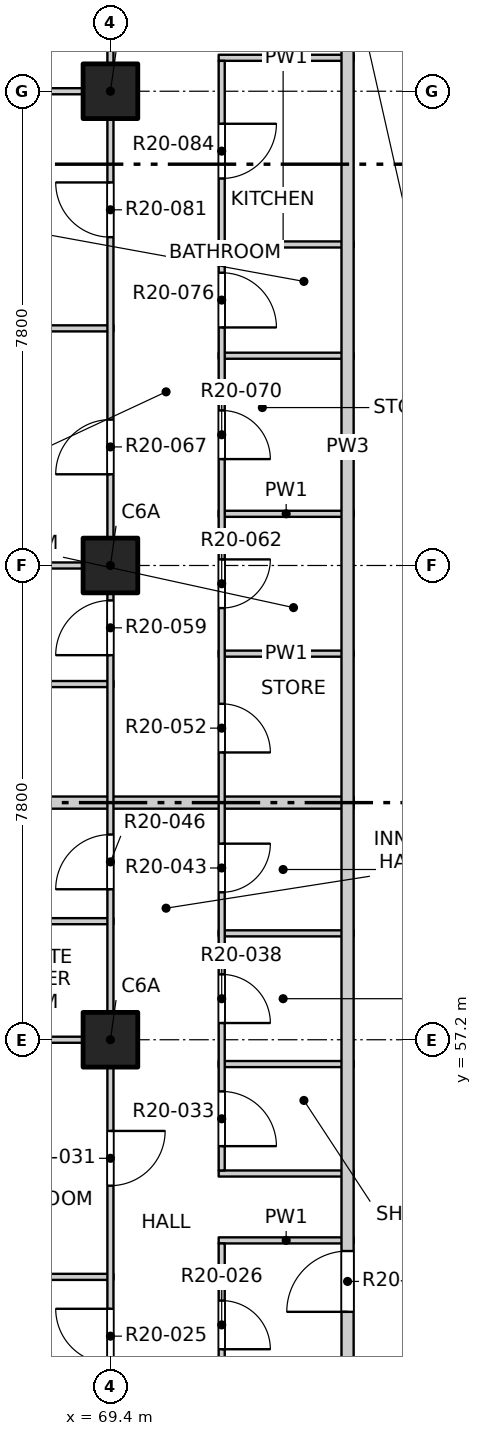
"""IFC4 building model, lengths in metres.
Left out: names, types, materials, properties, quantities, classifications, styles, units other than length and angle.
Written with IfcOpenShell. Run it as: python <this file> out.ifc"""

import sys

from ifc_helpers import new_model, si_unit, direction, frame, frame_2d, origin, origin_2d, place, context, subcontext, project, spatial, rectangle, extrude, element, fill, save


model = new_model("IFC4")
c1 = context("Model", 3, precision=1e-05, world=origin(), true_north=direction((0.0, 1.0)))
c2 = subcontext(c1, "Body", "Model", "MODEL_VIEW")
j1 = project(units=[si_unit("LENGTHUNIT", "METRE"), si_unit("PLANEANGLEUNIT", "RADIAN")], contexts=[c1])
p1 = place(None, origin())
s1 = spatial("IfcSite", under=j1, at=p1, CompositionType="ELEMENT")
p2 = place(p1, origin())
s2 = spatial("IfcBuilding", under=s1, at=p2, CompositionType="ELEMENT")
p3 = place(p2, frame((0.0, 0.0, 204.1)))
s3 = spatial("IfcBuildingStorey", under=s2, at=p3, CompositionType="ELEMENT", Elevation=204.1)
for number, where, z_axis, x_axis in (
    (1, (69.4, 57.2, -0.25), (0.0, 0.0, 1.0), (1.0, 0.0, 0.0)),
    (2, (69.4, 65.0, -0.25), (0.0, 0.0, 1.0), (1.0, 0.0, 0.0)),
    (3, (69.4, 72.8, -0.25), (0.0, 0.0, 1.0), (1.0, 0.0, 0.0)),
):
    element("IfcColumn", number, at=place(p3, frame(where, z_axis=z_axis, x_axis=x_axis)), inside=s3, PredefinedType="COLUMN", context=c2, shape_type="SweptSolid", body=[
        extrude(rectangle(XDim=0.9, YDim=0.9, at=origin_2d()), origin(), (0.0, 0.0, 1.0), 3.4),
    ])
p4 = place(p3, frame((61.9, 53.3, 0.0), z_axis=(0.0, 0.0, 1.0), x_axis=(1.0, 0.0, 0.0)))
e4 = element("IfcWall", 4, at=p4, inside=s3, PredefinedType="PARTITIONING", context=c2, shape_type="SweptSolid", body=[
    extrude(rectangle(XDim=7.55, YDim=0.1, at=frame_2d((3.775, 0.0))), origin(), (0.0, 0.0, 1.0), 3.15),
])
for number, where, z_axis, x_axis in (
    (5, (71.18, 53.9, 0.0), (0.0, 0.0, 1.0), (1.0, 0.0, 0.0)),
    (6, (71.18, 55.0, 0.0), (0.0, 0.0, 1.0), (1.0, 0.0, 0.0)),
    (7, (71.18, 56.8, 0.0), (0.0, 0.0, 1.0), (1.0, 0.0, 0.0)),
):
    element("IfcWall", number, at=place(p3, frame(where, z_axis=z_axis, x_axis=x_axis)), inside=s3, PredefinedType="PARTITIONING", context=c2, shape_type="SweptSolid", body=[
        extrude(rectangle(XDim=2.22, YDim=0.1, at=frame_2d((1.11, 0.0))), origin(), (0.0, 0.0, 1.0), 3.15),
    ])
p5 = place(p3, frame((61.9, 57.2, 0.0), z_axis=(0.0, 0.0, 1.0), x_axis=(1.0, 0.0, 0.0)))
e8 = element("IfcWall", 8, at=p5, inside=s3, PredefinedType="PARTITIONING", context=c2, shape_type="SweptSolid", body=[
    extrude(rectangle(XDim=7.55, YDim=0.1, at=frame_2d((3.775, 0.0))), origin(), (0.0, 0.0, 1.0), 3.15),
])
p6 = place(p3, frame((71.18, 58.95, 0.0), z_axis=(0.0, 0.0, 1.0), x_axis=(1.0, 0.0, 0.0)))
e9 = element("IfcWall", 9, at=p6, inside=s3, PredefinedType="PARTITIONING", context=c2, shape_type="SweptSolid", body=[
    extrude(rectangle(XDim=2.22, YDim=0.1, at=frame_2d((1.11, 0.0))), origin(), (0.0, 0.0, 1.0), 3.15),
])
p7 = place(p3, frame((66.05, 59.15, 0.0), z_axis=(0.0, 0.0, 1.0), x_axis=(1.0, 0.0, 0.0)))
e10 = element("IfcWall", 10, at=p7, inside=s3, PredefinedType="PARTITIONING", context=c2, shape_type="SweptSolid", body=[
    extrude(rectangle(XDim=3.4, YDim=0.1, at=frame_2d((1.7, 0.0))), origin(), (0.0, 0.0, 1.0), 3.15),
])
p8 = place(p3, frame((61.9, 61.1, 0.0), z_axis=(0.0, 0.0, 1.0), x_axis=(1.0, 0.0, 0.0)))
e11 = element("IfcWall", 11, at=p8, inside=s3, PredefinedType="PARTITIONING", context=c2, shape_type="SweptSolid", body=[
    extrude(rectangle(XDim=11.5, YDim=0.2, at=frame_2d((5.75, 0.0))), origin(), (0.0, 0.0, 1.0), 2.55),
])
p9 = place(p3, frame((65.75, 63.05, 0.0), z_axis=(0.0, 0.0, 1.0), x_axis=(1.0, 0.0, 0.0)))
e12 = element("IfcWall", 12, at=p9, inside=s3, PredefinedType="PARTITIONING", context=c2, shape_type="SweptSolid", body=[
    extrude(rectangle(XDim=3.7, YDim=0.1, at=frame_2d((1.85, 0.0))), origin(), (0.0, 0.0, 1.0), 3.15),
])
p10 = place(p3, frame((71.18, 63.55, 0.0), z_axis=(0.0, 0.0, 1.0), x_axis=(1.0, 0.0, 0.0)))
e13 = element("IfcWall", 13, at=p10, inside=s3, PredefinedType="PARTITIONING", context=c2, shape_type="SweptSolid", body=[
    extrude(rectangle(XDim=2.22, YDim=0.1, at=frame_2d((1.11, 0.0))), origin(), (0.0, 0.0, 1.0), 3.15),
])
p11 = place(p3, frame((61.9, 65.0, 0.0), z_axis=(0.0, 0.0, 1.0), x_axis=(1.0, 0.0, 0.0)))
e14 = element("IfcWall", 14, at=p11, inside=s3, PredefinedType="PARTITIONING", context=c2, shape_type="SweptSolid", body=[
    extrude(rectangle(XDim=7.55, YDim=0.1, at=frame_2d((3.775, 0.0))), origin(), (0.0, 0.0, 1.0), 3.15),
])
for number, where, z_axis, x_axis in (
    (15, (71.18, 65.85, 0.0), (0.0, 0.0, 1.0), (1.0, 0.0, 0.0)),
    (16, (71.18, 68.45, 0.0), (0.0, 0.0, 1.0), (1.0, 0.0, 0.0)),
):
    element("IfcWall", number, at=place(p3, frame(where, z_axis=z_axis, x_axis=x_axis)), inside=s3, PredefinedType="PARTITIONING", context=c2, shape_type="SweptSolid", body=[
        extrude(rectangle(XDim=2.22, YDim=0.1, at=frame_2d((1.11, 0.0))), origin(), (0.0, 0.0, 1.0), 3.15),
    ])
p12 = place(p3, frame((61.9, 68.9, 0.0), z_axis=(0.0, 0.0, 1.0), x_axis=(1.0, 0.0, 0.0)))
e17 = element("IfcWall", 17, at=p12, inside=s3, PredefinedType="PARTITIONING", context=c2, shape_type="SweptSolid", body=[
    extrude(rectangle(XDim=7.55, YDim=0.1, at=frame_2d((3.775, 0.0))), origin(), (0.0, 0.0, 1.0), 2.55),
])
p13 = place(p3, frame((71.18, 70.28, 0.0), z_axis=(0.0, 0.0, 1.0), x_axis=(1.0, 0.0, 0.0)))
e18 = element("IfcWall", 18, at=p13, inside=s3, PredefinedType="PARTITIONING", context=c2, shape_type="SweptSolid", body=[
    extrude(rectangle(XDim=2.22, YDim=0.1, at=frame_2d((1.11, 0.0))), origin(), (0.0, 0.0, 1.0), 3.15),
])
p14 = place(p3, frame((61.9, 72.8, 0.0), z_axis=(0.0, 0.0, 1.0), x_axis=(1.0, 0.0, 0.0)))
e19 = element("IfcWall", 19, at=p14, inside=s3, PredefinedType="PARTITIONING", context=c2, shape_type="SweptSolid", body=[
    extrude(rectangle(XDim=7.55, YDim=0.1, at=frame_2d((3.775, 0.0))), origin(), (0.0, 0.0, 1.0), 3.15),
])
p15 = place(p3, frame((71.18, 73.35, 0.0), z_axis=(0.0, 0.0, 1.0), x_axis=(1.0, 0.0, 0.0)))
e20 = element("IfcWall", 20, at=p15, inside=s3, PredefinedType="PARTITIONING", context=c2, shape_type="SweptSolid", body=[
    extrude(rectangle(XDim=2.22, YDim=0.1, at=frame_2d((1.11, 0.0))), origin(), (0.0, 0.0, 1.0), 3.15),
])
p16 = place(p3, frame((69.4, 41.9, 0.0), z_axis=(0.0, 0.0, 1.0), x_axis=(0.0, 1.0, 0.0)))
e21 = element("IfcWall", 21, at=p16, inside=s3, PredefinedType="PARTITIONING", context=c2, shape_type="SweptSolid", body=[
    extrude(rectangle(XDim=46.2, YDim=0.1, at=frame_2d((23.1, 0.0))), origin(), (0.0, 0.0, 1.0), 3.15),
])
p17 = place(p16, frame((1.2, 0.0, 0.0)))
e22 = element("IfcOpeningElement", 22, at=p17, cuts=e21, PredefinedType="OPENING", context=c2, shape_type="SweptSolid", body=[
    extrude(rectangle(XDim=0.9, YDim=2.1, at=frame_2d((0.45, 1.05))), frame((0.0, 0.06, 0.0), z_axis=(0.0, -1.0, 0.0), x_axis=(1.0, 0.0, 0.0)), (0.0, 0.0, 1.0), 0.12),
])
p18 = place(p16, frame((5.1, 0.0, 0.0)))
e23 = element("IfcOpeningElement", 23, at=p18, cuts=e21, PredefinedType="OPENING", context=c2, shape_type="SweptSolid", body=[
    extrude(rectangle(XDim=0.9, YDim=2.1, at=frame_2d((0.45, 1.05))), frame((0.0, 0.06, 0.0), z_axis=(0.0, -1.0, 0.0), x_axis=(1.0, 0.0, 0.0)), (0.0, 0.0, 1.0), 0.12),
])
p19 = place(p16, frame((9.975, 0.0, 0.0)))
e24 = element("IfcOpeningElement", 24, at=p19, cuts=e21, PredefinedType="OPENING", context=c2, shape_type="SweptSolid", body=[
    extrude(rectangle(XDim=0.9, YDim=2.1, at=frame_2d((0.45, 1.05))), frame((0.0, 0.06, 0.0), z_axis=(0.0, -1.0, 0.0), x_axis=(1.0, 0.0, 0.0)), (0.0, 0.0, 1.0), 0.12),
])
p20 = place(p16, frame((12.9, 0.0, 0.0)))
e25 = element("IfcOpeningElement", 25, at=p20, cuts=e21, PredefinedType="OPENING", context=c2, shape_type="SweptSolid", body=[
    extrude(rectangle(XDim=0.9, YDim=2.1, at=frame_2d((0.45, 1.05))), frame((0.0, 0.06, 0.0), z_axis=(0.0, -1.0, 0.0), x_axis=(1.0, 0.0, 0.0)), (0.0, 0.0, 1.0), 0.12),
])
p21 = place(p16, frame((17.775, 0.0, 0.0)))
e26 = element("IfcOpeningElement", 26, at=p21, cuts=e21, PredefinedType="OPENING", context=c2, shape_type="SweptSolid", body=[
    extrude(rectangle(XDim=0.9, YDim=2.1, at=frame_2d((0.45, 1.05))), frame((0.0, 0.06, 0.0), z_axis=(0.0, -1.0, 0.0), x_axis=(1.0, 0.0, 0.0)), (0.0, 0.0, 1.0), 0.12),
])
p22 = place(p16, frame((21.625, 0.0, 0.0)))
e27 = element("IfcOpeningElement", 27, at=p22, cuts=e21, PredefinedType="OPENING", context=c2, shape_type="SweptSolid", body=[
    extrude(rectangle(XDim=0.9, YDim=2.1, at=frame_2d((0.45, 1.05))), frame((0.0, 0.06, 0.0), z_axis=(0.0, -1.0, 0.0), x_axis=(1.0, 0.0, 0.0)), (0.0, 0.0, 1.0), 0.12),
])
p23 = place(p16, frame((24.6, 0.0, 0.0)))
e28 = element("IfcOpeningElement", 28, at=p23, cuts=e21, PredefinedType="OPENING", context=c2, shape_type="SweptSolid", body=[
    extrude(rectangle(XDim=0.9, YDim=2.1, at=frame_2d((0.45, 1.05))), frame((0.0, 0.06, 0.0), z_axis=(0.0, -1.0, 0.0), x_axis=(1.0, 0.0, 0.0)), (0.0, 0.0, 1.0), 0.12),
])
p24 = place(p16, frame((28.5, 0.0, 0.0)))
e29 = element("IfcOpeningElement", 29, at=p24, cuts=e21, PredefinedType="OPENING", context=c2, shape_type="SweptSolid", body=[
    extrude(rectangle(XDim=0.9, YDim=2.1, at=frame_2d((0.45, 1.05))), frame((0.0, 0.06, 0.0), z_axis=(0.0, -1.0, 0.0), x_axis=(1.0, 0.0, 0.0)), (0.0, 0.0, 1.0), 0.12),
])
p25 = place(p16, frame((33.375, 0.0, 0.0)))
e30 = element("IfcOpeningElement", 30, at=p25, cuts=e21, PredefinedType="OPENING", context=c2, shape_type="SweptSolid", body=[
    extrude(rectangle(XDim=0.9, YDim=2.1, at=frame_2d((0.45, 1.05))), frame((0.0, 0.06, 0.0), z_axis=(0.0, -1.0, 0.0), x_axis=(1.0, 0.0, 0.0)), (0.0, 0.0, 1.0), 0.12),
])
p26 = place(p16, frame((37.225, 0.0, 0.0)))
e31 = element("IfcOpeningElement", 31, at=p26, cuts=e21, PredefinedType="OPENING", context=c2, shape_type="SweptSolid", body=[
    extrude(rectangle(XDim=0.9, YDim=2.1, at=frame_2d((0.45, 1.05))), frame((0.0, 0.06, 0.0), z_axis=(0.0, -1.0, 0.0), x_axis=(1.0, 0.0, 0.0)), (0.0, 0.0, 1.0), 0.12),
])
p27 = place(p16, frame((40.2, 0.0, 0.0)))
e32 = element("IfcOpeningElement", 32, at=p27, cuts=e21, PredefinedType="OPENING", context=c2, shape_type="SweptSolid", body=[
    extrude(rectangle(XDim=0.9, YDim=2.1, at=frame_2d((0.45, 1.05))), frame((0.0, 0.06, 0.0), z_axis=(0.0, -1.0, 0.0), x_axis=(1.0, 0.0, 0.0)), (0.0, 0.0, 1.0), 0.12),
])
p28 = place(p16, frame((44.1, 0.0, 0.0)))
e33 = element("IfcOpeningElement", 33, at=p28, cuts=e21, PredefinedType="OPENING", context=c2, shape_type="SweptSolid", body=[
    extrude(rectangle(XDim=0.9, YDim=2.1, at=frame_2d((0.45, 1.05))), frame((0.0, 0.06, 0.0), z_axis=(0.0, -1.0, 0.0), x_axis=(1.0, 0.0, 0.0)), (0.0, 0.0, 1.0), 0.12),
])
p29 = place(p3, frame((71.23, 45.55, 0.0), z_axis=(0.0, 0.0, 1.0), x_axis=(0.0, 1.0, 0.0)))
e34 = element("IfcWall", 34, at=p29, inside=s3, PredefinedType="PARTITIONING", context=c2, shape_type="SweptSolid", body=[
    extrude(rectangle(XDim=8.3, YDim=0.1, at=frame_2d((4.15, 0.0))), origin(), (0.0, 0.0, 1.0), 3.15),
])
p30 = place(p29, frame((1.11, 0.0, 0.0)))
e35 = element("IfcOpeningElement", 35, at=p30, cuts=e34, PredefinedType="OPENING", context=c2, shape_type="SweptSolid", body=[
    extrude(rectangle(XDim=0.9, YDim=2.1, at=frame_2d((0.45, 1.05))), frame((0.0, 0.06, 0.0), z_axis=(0.0, -1.0, 0.0), x_axis=(1.0, 0.0, 0.0)), (0.0, 0.0, 1.0), 0.12),
])
p31 = place(p29, frame((3.92, 0.0, 0.0)))
e36 = element("IfcOpeningElement", 36, at=p31, cuts=e34, PredefinedType="OPENING", context=c2, shape_type="SweptSolid", body=[
    extrude(rectangle(XDim=0.9, YDim=2.1, at=frame_2d((0.45, 1.05))), frame((0.0, 0.06, 0.0), z_axis=(0.0, -1.0, 0.0), x_axis=(1.0, 0.0, 0.0)), (0.0, 0.0, 1.0), 0.12),
])
p32 = place(p29, frame((6.56, 0.0, 0.0)))
e37 = element("IfcOpeningElement", 37, at=p32, cuts=e34, PredefinedType="OPENING", context=c2, shape_type="SweptSolid", body=[
    extrude(rectangle(XDim=0.8, YDim=2.1, at=frame_2d((0.4, 1.05))), frame((0.0, 0.06, 0.0), z_axis=(0.0, -1.0, 0.0), x_axis=(1.0, 0.0, 0.0)), (0.0, 0.0, 1.0), 0.12),
])
p33 = place(p3, frame((71.23, 55.05, 0.0), z_axis=(0.0, 0.0, 1.0), x_axis=(0.0, 1.0, 0.0)))
e38 = element("IfcWall", 38, at=p33, inside=s3, PredefinedType="PARTITIONING", context=c2, shape_type="SweptSolid", body=[
    extrude(rectangle(XDim=18.25, YDim=0.1, at=frame_2d((9.125, 0.0))), origin(), (0.0, 0.0, 1.0), 3.15),
])
p34 = place(p33, frame((0.4, 0.0, 0.0)))
e39 = element("IfcOpeningElement", 39, at=p34, cuts=e38, PredefinedType="OPENING", context=c2, shape_type="SweptSolid", body=[
    extrude(rectangle(XDim=0.9, YDim=2.1, at=frame_2d((0.45, 1.05))), frame((0.0, 0.06, 0.0), z_axis=(0.0, -1.0, 0.0), x_axis=(1.0, 0.0, 0.0)), (0.0, 0.0, 1.0), 0.12),
])
p35 = place(p33, frame((2.425, 0.0, 0.0)))
e40 = element("IfcOpeningElement", 40, at=p35, cuts=e38, PredefinedType="OPENING", context=c2, shape_type="SweptSolid", body=[
    extrude(rectangle(XDim=0.8, YDim=2.1, at=frame_2d((0.4, 1.05))), frame((0.0, 0.06, 0.0), z_axis=(0.0, -1.0, 0.0), x_axis=(1.0, 0.0, 0.0)), (0.0, 0.0, 1.0), 0.12),
])
p36 = place(p33, frame((4.575, 0.0, 0.0)))
e41 = element("IfcOpeningElement", 41, at=p36, cuts=e38, PredefinedType="OPENING", context=c2, shape_type="SweptSolid", body=[
    extrude(rectangle(XDim=0.8, YDim=2.1, at=frame_2d((0.4, 1.05))), frame((0.0, 0.06, 0.0), z_axis=(0.0, -1.0, 0.0), x_axis=(1.0, 0.0, 0.0)), (0.0, 0.0, 1.0), 0.12),
])
p37 = place(p33, frame((6.875, 0.0, 0.0)))
e42 = element("IfcOpeningElement", 42, at=p37, cuts=e38, PredefinedType="OPENING", context=c2, shape_type="SweptSolid", body=[
    extrude(rectangle(XDim=0.8, YDim=2.1, at=frame_2d((0.4, 1.05))), frame((0.0, 0.06, 0.0), z_axis=(0.0, -1.0, 0.0), x_axis=(1.0, 0.0, 0.0)), (0.0, 0.0, 1.0), 0.12),
])
p38 = place(p33, frame((9.25, 0.0, 0.0)))
e43 = element("IfcOpeningElement", 43, at=p38, cuts=e38, PredefinedType="OPENING", context=c2, shape_type="SweptSolid", body=[
    extrude(rectangle(XDim=0.8, YDim=2.1, at=frame_2d((0.4, 1.05))), frame((0.0, 0.06, 0.0), z_axis=(0.0, -1.0, 0.0), x_axis=(1.0, 0.0, 0.0)), (0.0, 0.0, 1.0), 0.12),
])
p39 = place(p33, frame((11.7, 0.0, 0.0)))
e44 = element("IfcOpeningElement", 44, at=p39, cuts=e38, PredefinedType="OPENING", context=c2, shape_type="SweptSolid", body=[
    extrude(rectangle(XDim=0.8, YDim=2.1, at=frame_2d((0.4, 1.05))), frame((0.0, 0.06, 0.0), z_axis=(0.0, -1.0, 0.0), x_axis=(1.0, 0.0, 0.0)), (0.0, 0.0, 1.0), 0.12),
])
p40 = place(p33, frame((13.865, 0.0, 0.0)))
e45 = element("IfcOpeningElement", 45, at=p40, cuts=e38, PredefinedType="OPENING", context=c2, shape_type="SweptSolid", body=[
    extrude(rectangle(XDim=0.9, YDim=2.1, at=frame_2d((0.45, 1.05))), frame((0.0, 0.06, 0.0), z_axis=(0.0, -1.0, 0.0), x_axis=(1.0, 0.0, 0.0)), (0.0, 0.0, 1.0), 0.12),
])
p41 = place(p33, frame((16.315, 0.0, 0.0)))
e46 = element("IfcOpeningElement", 46, at=p41, cuts=e38, PredefinedType="OPENING", context=c2, shape_type="SweptSolid", body=[
    extrude(rectangle(XDim=0.9, YDim=2.1, at=frame_2d((0.45, 1.05))), frame((0.0, 0.06, 0.0), z_axis=(0.0, -1.0, 0.0), x_axis=(1.0, 0.0, 0.0)), (0.0, 0.0, 1.0), 0.12),
])
p42 = place(p3, frame((73.3, 49.5, 0.0), z_axis=(0.0, 0.0, 1.0), x_axis=(0.0, 1.0, 0.0)))
e47 = element("IfcWall", 47, at=p42, inside=s3, PredefinedType="PARTITIONING", context=c2, shape_type="SweptSolid", body=[
    extrude(rectangle(XDim=34.9, YDim=0.2, at=frame_2d((17.45, 0.0))), origin(), (0.0, 0.0, 1.0), 3.15),
])
p43 = place(p42, frame((3.225, 0.0, 0.0)))
e48 = element("IfcOpeningElement", 48, at=p43, cuts=e47, PredefinedType="OPENING", context=c2, shape_type="SweptSolid", body=[
    extrude(rectangle(XDim=1.0, YDim=2.1, at=frame_2d((0.5, 1.05))), frame((0.0, 0.11, 0.0), z_axis=(0.0, -1.0, 0.0), x_axis=(1.0, 0.0, 0.0)), (0.0, 0.0, 1.0), 0.22),
])
p44 = place(p42, frame((25.125, 0.0, 0.0)))
e49 = element("IfcOpeningElement", 49, at=p44, cuts=e47, PredefinedType="OPENING", context=c2, shape_type="SweptSolid", body=[
    extrude(rectangle(XDim=1.0, YDim=2.1, at=frame_2d((0.5, 1.05))), frame((0.0, 0.11, 0.0), z_axis=(0.0, -1.0, 0.0), x_axis=(1.0, 0.0, 0.0)), (0.0, 0.0, 1.0), 0.22),
])
p45 = place(p42, frame((31.475, 0.0, 0.0)))
e50 = element("IfcOpeningElement", 50, at=p45, cuts=e47, PredefinedType="OPENING", context=c2, shape_type="SweptSolid", body=[
    extrude(rectangle(XDim=1.0, YDim=2.1, at=frame_2d((0.5, 1.05))), frame((0.0, 0.11, 0.0), z_axis=(0.0, -1.0, 0.0), x_axis=(1.0, 0.0, 0.0)), (0.0, 0.0, 1.0), 0.22),
])
p46 = place(p19, origin())
e51 = element("IfcDoor", 51, at=p46, inside=s3, OperationType="SINGLE_SWING_RIGHT", PredefinedType="DOOR", context=c2, shape_type="SweptSolid", body=[
    extrude(rectangle(XDim=0.9, YDim=2.1, at=frame_2d((0.45, 1.05))), frame((0.0, 0.025, 0.0), z_axis=(0.0, -1.0, 0.0), x_axis=(1.0, 0.0, 0.0)), (0.0, 0.0, 1.0), 0.05),
])
fill(e24, e51)
p47 = place(p32, origin())
e52 = element("IfcDoor", 52, at=p47, inside=s3, OperationType="SINGLE_SWING_RIGHT", PredefinedType="DOOR", context=c2, shape_type="SweptSolid", body=[
    extrude(rectangle(XDim=0.8, YDim=2.1, at=frame_2d((0.4, 1.05))), frame((0.0, 0.025, 0.0), z_axis=(0.0, -1.0, 0.0), x_axis=(1.0, 0.0, 0.0)), (0.0, 0.0, 1.0), 0.05),
])
fill(e37, e52)
p48 = place(p43, origin())
e53 = element("IfcDoor", 53, at=p48, inside=s3, OperationType="SINGLE_SWING_LEFT", PredefinedType="DOOR", context=c2, shape_type="SweptSolid", body=[
    extrude(rectangle(XDim=1.0, YDim=2.1, at=frame_2d((0.5, 1.05))), frame((0.0, 0.025, 0.0), z_axis=(0.0, -1.0, 0.0), x_axis=(1.0, 0.0, 0.0)), (0.0, 0.0, 1.0), 0.05),
])
fill(e48, e53)
p49 = place(p20, origin())
e54 = element("IfcDoor", 54, at=p49, inside=s3, OperationType="SINGLE_SWING_LEFT", PredefinedType="DOOR", context=c2, shape_type="SweptSolid", body=[
    extrude(rectangle(XDim=0.9, YDim=2.1, at=frame_2d((0.45, 1.05))), frame((0.0, 0.025, 0.0), z_axis=(0.0, -1.0, 0.0), x_axis=(1.0, 0.0, 0.0)), (0.0, 0.0, 1.0), 0.05),
])
fill(e25, e54)
p50 = place(p34, origin())
e55 = element("IfcDoor", 55, at=p50, inside=s3, OperationType="SINGLE_SWING_RIGHT", PredefinedType="DOOR", context=c2, shape_type="SweptSolid", body=[
    extrude(rectangle(XDim=0.9, YDim=2.1, at=frame_2d((0.45, 1.05))), frame((0.0, 0.025, 0.0), z_axis=(0.0, -1.0, 0.0), x_axis=(1.0, 0.0, 0.0)), (0.0, 0.0, 1.0), 0.05),
])
fill(e39, e55)
p51 = place(p35, origin())
e56 = element("IfcDoor", 56, at=p51, inside=s3, OperationType="SINGLE_SWING_RIGHT", PredefinedType="DOOR", context=c2, shape_type="SweptSolid", body=[
    extrude(rectangle(XDim=0.8, YDim=2.1, at=frame_2d((0.4, 1.05))), frame((0.0, 0.025, 0.0), z_axis=(0.0, -1.0, 0.0), x_axis=(1.0, 0.0, 0.0)), (0.0, 0.0, 1.0), 0.05),
])
fill(e40, e56)
p52 = place(p36, origin())
e57 = element("IfcDoor", 57, at=p52, inside=s3, OperationType="SINGLE_SWING_LEFT", PredefinedType="DOOR", context=c2, shape_type="SweptSolid", body=[
    extrude(rectangle(XDim=0.8, YDim=2.1, at=frame_2d((0.4, 1.05))), frame((0.0, 0.025, 0.0), z_axis=(0.0, -1.0, 0.0), x_axis=(1.0, 0.0, 0.0)), (0.0, 0.0, 1.0), 0.05),
])
fill(e41, e57)
p53 = place(p21, origin())
e58 = element("IfcDoor", 58, at=p53, inside=s3, OperationType="SINGLE_SWING_LEFT", PredefinedType="DOOR", context=c2, shape_type="SweptSolid", body=[
    extrude(rectangle(XDim=0.9, YDim=2.1, at=frame_2d((0.45, 1.05))), frame((0.0, 0.025, 0.0), z_axis=(0.0, -1.0, 0.0), x_axis=(1.0, 0.0, 0.0)), (0.0, 0.0, 1.0), 0.05),
])
fill(e26, e58)
p54 = place(p37, origin())
e59 = element("IfcDoor", 59, at=p54, inside=s3, OperationType="SINGLE_SWING_RIGHT", PredefinedType="DOOR", context=c2, shape_type="SweptSolid", body=[
    extrude(rectangle(XDim=0.8, YDim=2.1, at=frame_2d((0.4, 1.05))), frame((0.0, 0.025, 0.0), z_axis=(0.0, -1.0, 0.0), x_axis=(1.0, 0.0, 0.0)), (0.0, 0.0, 1.0), 0.05),
])
fill(e42, e59)
p55 = place(p22, origin())
e60 = element("IfcDoor", 60, at=p55, inside=s3, OperationType="SINGLE_SWING_LEFT", PredefinedType="DOOR", context=c2, shape_type="SweptSolid", body=[
    extrude(rectangle(XDim=0.9, YDim=2.1, at=frame_2d((0.45, 1.05))), frame((0.0, 0.025, 0.0), z_axis=(0.0, -1.0, 0.0), x_axis=(1.0, 0.0, 0.0)), (0.0, 0.0, 1.0), 0.05),
])
fill(e27, e60)
p56 = place(p38, origin())
e61 = element("IfcDoor", 61, at=p56, inside=s3, OperationType="SINGLE_SWING_LEFT", PredefinedType="DOOR", context=c2, shape_type="SweptSolid", body=[
    extrude(rectangle(XDim=0.8, YDim=2.1, at=frame_2d((0.4, 1.05))), frame((0.0, 0.025, 0.0), z_axis=(0.0, -1.0, 0.0), x_axis=(1.0, 0.0, 0.0)), (0.0, 0.0, 1.0), 0.05),
])
fill(e43, e61)
p57 = place(p23, origin())
e62 = element("IfcDoor", 62, at=p57, inside=s3, OperationType="SINGLE_SWING_LEFT", PredefinedType="DOOR", context=c2, shape_type="SweptSolid", body=[
    extrude(rectangle(XDim=0.9, YDim=2.1, at=frame_2d((0.45, 1.05))), frame((0.0, 0.025, 0.0), z_axis=(0.0, -1.0, 0.0), x_axis=(1.0, 0.0, 0.0)), (0.0, 0.0, 1.0), 0.05),
])
fill(e28, e62)
p58 = place(p39, origin())
e63 = element("IfcDoor", 63, at=p58, inside=s3, OperationType="SINGLE_SWING_RIGHT", PredefinedType="DOOR", context=c2, shape_type="SweptSolid", body=[
    extrude(rectangle(XDim=0.8, YDim=2.1, at=frame_2d((0.4, 1.05))), frame((0.0, 0.025, 0.0), z_axis=(0.0, -1.0, 0.0), x_axis=(1.0, 0.0, 0.0)), (0.0, 0.0, 1.0), 0.05),
])
fill(e44, e63)
p59 = place(p40, origin())
e64 = element("IfcDoor", 64, at=p59, inside=s3, OperationType="SINGLE_SWING_RIGHT", PredefinedType="DOOR", context=c2, shape_type="SweptSolid", body=[
    extrude(rectangle(XDim=0.9, YDim=2.1, at=frame_2d((0.45, 1.05))), frame((0.0, 0.025, 0.0), z_axis=(0.0, -1.0, 0.0), x_axis=(1.0, 0.0, 0.0)), (0.0, 0.0, 1.0), 0.05),
])
fill(e45, e64)
p60 = place(p24, origin())
e65 = element("IfcDoor", 65, at=p60, inside=s3, OperationType="SINGLE_SWING_RIGHT", PredefinedType="DOOR", context=c2, shape_type="SweptSolid", body=[
    extrude(rectangle(XDim=0.9, YDim=2.1, at=frame_2d((0.45, 1.05))), frame((0.0, 0.025, 0.0), z_axis=(0.0, -1.0, 0.0), x_axis=(1.0, 0.0, 0.0)), (0.0, 0.0, 1.0), 0.05),
])
fill(e29, e65)
p61 = place(p41, origin())
e66 = element("IfcDoor", 66, at=p61, inside=s3, OperationType="SINGLE_SWING_LEFT", PredefinedType="DOOR", context=c2, shape_type="SweptSolid", body=[
    extrude(rectangle(XDim=0.9, YDim=2.1, at=frame_2d((0.45, 1.05))), frame((0.0, 0.025, 0.0), z_axis=(0.0, -1.0, 0.0), x_axis=(1.0, 0.0, 0.0)), (0.0, 0.0, 1.0), 0.05),
])
fill(e46, e66)
save(model, sys.argv[1])
